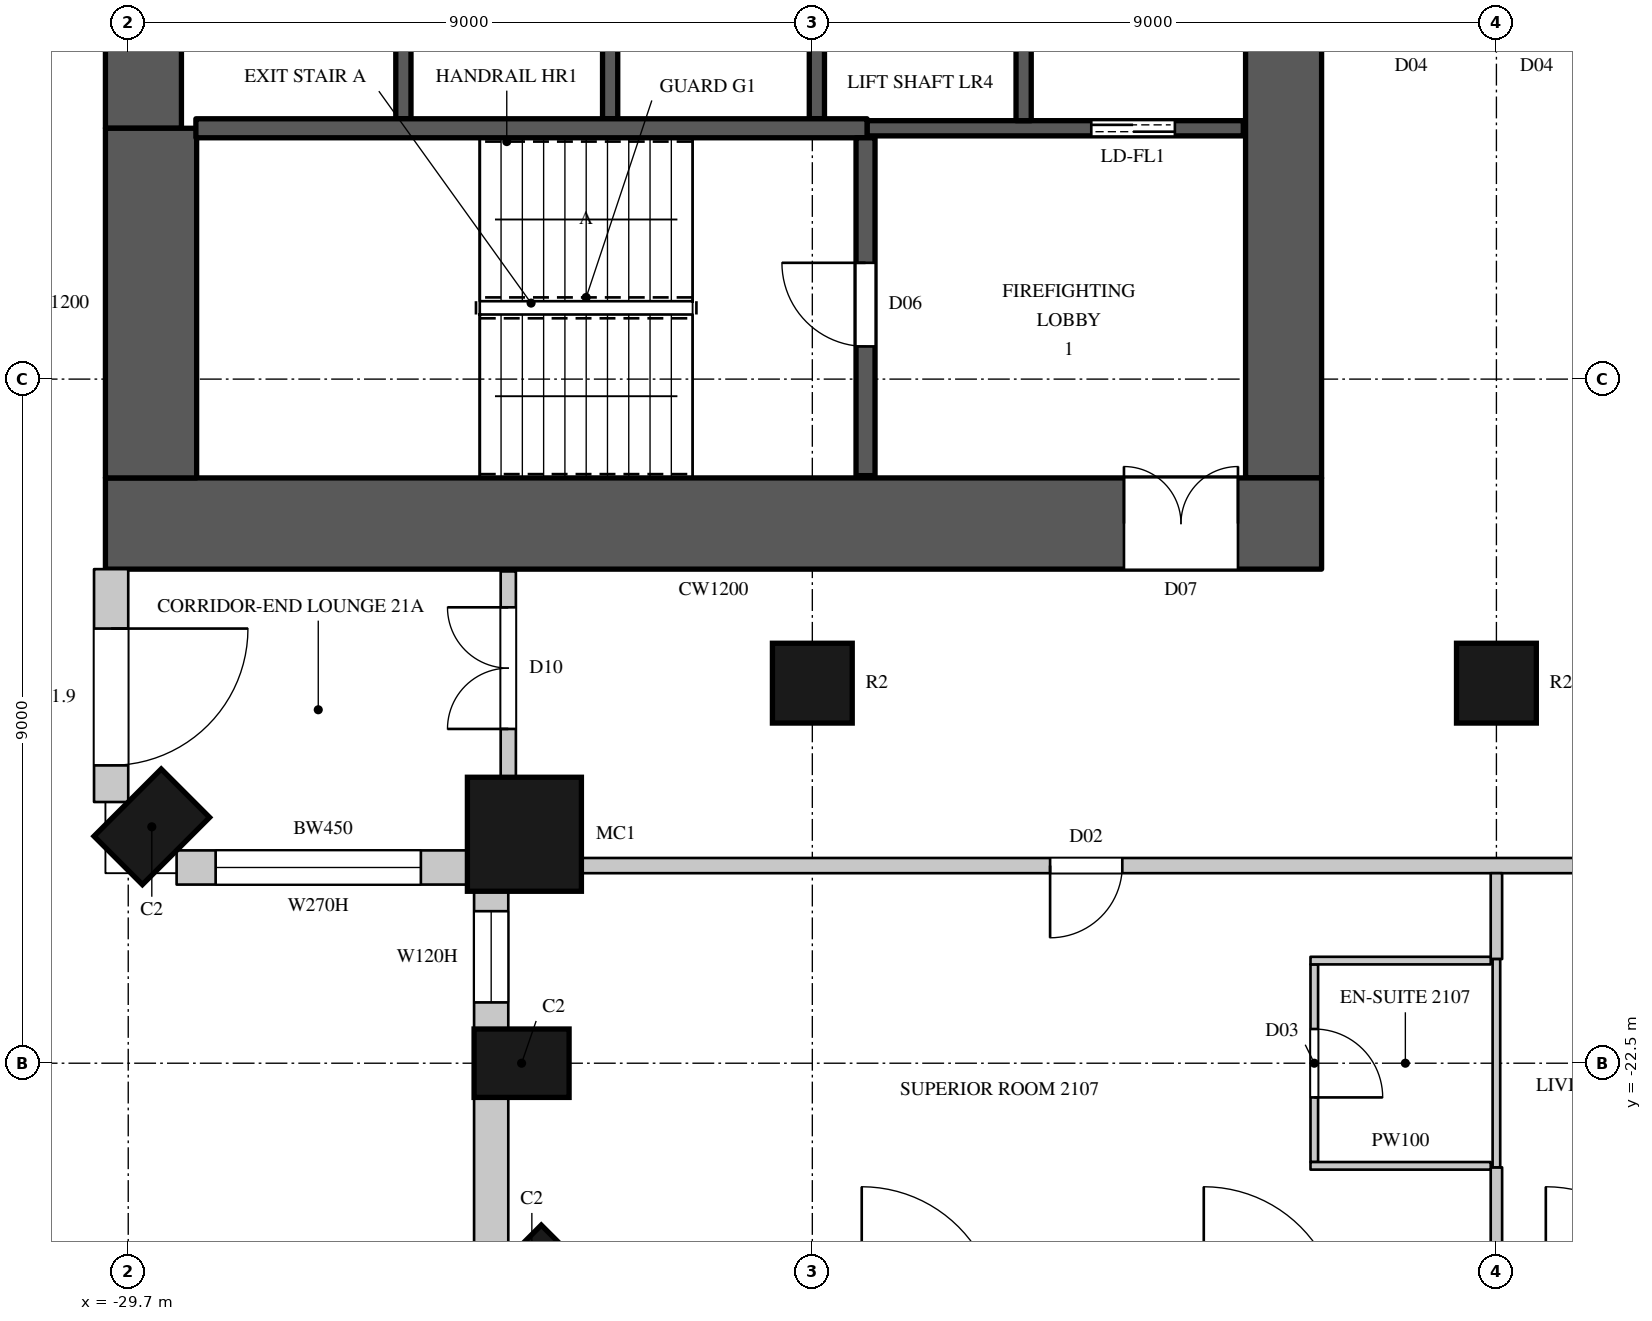
"""IFC4 building model, lengths in metres.
Left out: names, types, materials, properties, quantities, classifications, styles, units other than length and angle.
Written with IfcOpenShell. Run it as: python <this file> out.ifc"""

import sys

from ifc_helpers import new_model, si_unit, direction, frame, frame_2d, origin, origin_2d, place, context, subcontext, project, spatial, rectangle, circle, extrude, element, fill, save


model = new_model("IFC4")
c1 = context("Model", 3, precision=1e-05, world=origin(), true_north=direction((0.0, 1.0)))
c2 = subcontext(c1, "Body", "Model", "MODEL_VIEW")
j1 = project(units=[si_unit("LENGTHUNIT", "METRE"), si_unit("PLANEANGLEUNIT", "RADIAN")], contexts=[c1])
p1 = place(None, origin())
s1 = spatial("IfcSite", under=j1, at=p1, CompositionType="ELEMENT")
p2 = place(p1, origin())
s2 = spatial("IfcBuilding", under=s1, at=p2, CompositionType="ELEMENT")
p3 = place(p2, frame((0.0, 0.0, 105.9)))
s3 = spatial("IfcBuildingStorey", under=s2, at=p3, CompositionType="ELEMENT", Elevation=105.9)
p4 = place(p3, frame((-29.39, -19.39, 0.0), z_axis=(0.0, 0.0, 1.0), x_axis=(0.707106781187, -0.707106781187, 0.0)))
e1 = element("IfcColumn", 1, at=p4, inside=s3, PredefinedType="COLUMN", context=c2, shape_type="SweptSolid", body=[
    extrude(rectangle(XDim=0.9, YDim=1.25, at=origin_2d()), origin(), (0.0, 0.0, 1.0), 3.6),
])
p5 = place(p3, frame((-24.488, -19.488, 0.0), z_axis=(0.0, 0.0, 1.0), x_axis=(1.0, 0.0, 0.0)))
e2 = element("IfcColumn", 2, at=p5, inside=s3, PredefinedType="COLUMN", context=c2, shape_type="SweptSolid", body=[
    extrude(circle(Radius=0.75, at=origin_2d()), origin(), (0.0, 0.0, 1.0), 3.6),
])
for number, where, z_axis, x_axis in (
    (3, (-24.525, -22.5, 0.0), (0.0, 0.0, 1.0), (0.0, -1.0, 0.0)),
    (4, (-24.39, -25.39, 0.0), (0.0, 0.0, 1.0), (0.707, -0.707, 0.0)),
):
    element("IfcColumn", number, at=place(p3, frame(where, z_axis=z_axis, x_axis=x_axis)), inside=s3, PredefinedType="COLUMN", context=c2, shape_type="SweptSolid", body=[
        extrude(rectangle(XDim=0.9, YDim=1.25, at=origin_2d()), origin(), (0.0, 0.0, 1.0), 3.6),
    ])
for number, where, z_axis, x_axis in (
    (5, (-20.7, -17.5, 0.0), (0.0, 0.0, 1.0), (1.0, 0.0, 0.0)),
    (6, (-11.7, -17.5, 0.0), (0.0, 0.0, 1.0), (1.0, 0.0, 0.0)),
):
    element("IfcColumn", number, at=place(p3, frame(where, z_axis=z_axis, x_axis=x_axis)), inside=s3, PredefinedType="COLUMN", context=c2, shape_type="SweptSolid", body=[
        extrude(circle(Radius=0.525, at=origin_2d()), origin(), (0.0, 0.0, 1.0), 3.6),
    ])
p6 = place(p3, frame((-29.925, -16.0, 0.0), z_axis=(0.0, 0.0, 1.0), x_axis=(0.0, -1.0, 0.0)))
e7 = element("IfcWall", 7, at=p6, inside=s3, PredefinedType="SOLIDWALL", context=c2, shape_type="SweptSolid", body=[
    extrude(rectangle(XDim=3.064, YDim=0.45, at=frame_2d((1.532, 0.0))), origin(), (0.0, 0.0, 1.0), 3.3),
])
p7 = place(p6, frame((0.782, 0.0, 0.0)))
e8 = element("IfcOpeningElement", 8, at=p7, cuts=e7, PredefinedType="OPENING", context=c2, shape_type="SweptSolid", body=[
    extrude(rectangle(XDim=1.8, YDim=2.4, at=frame_2d((0.9, 1.2))), frame((0.0, 0.235, 0.0), z_axis=(0.0, -1.0, 0.0), x_axis=(1.0, 0.0, 0.0)), (0.0, 0.0, 1.0), 0.47),
])
p8 = place(p3, frame((-29.064, -19.925, 0.0), z_axis=(0.0, 0.0, 1.0), x_axis=(1.0, 0.0, 0.0)))
e9 = element("IfcWall", 9, at=p8, inside=s3, PredefinedType="SOLIDWALL", context=c2, shape_type="SweptSolid", body=[
    extrude(rectangle(XDim=3.857, YDim=0.45, at=frame_2d((1.928, 0.0))), origin(), (0.0, 0.0, 1.0), 3.3),
])
p9 = place(p8, frame((0.514, 0.0, 1.05)))
e10 = element("IfcOpeningElement", 10, at=p9, cuts=e9, PredefinedType="OPENING", context=c2, shape_type="SweptSolid", body=[
    extrude(rectangle(XDim=2.7, YDim=2.0, at=frame_2d((1.35, 1.0))), frame((0.0, 0.235, 0.0), z_axis=(0.0, -1.0, 0.0), x_axis=(1.0, 0.0, 0.0)), (0.0, 0.0, 1.0), 0.47),
])
p10 = place(p3, frame((-24.925, -20.207, 0.0), z_axis=(0.0, 0.0, 1.0), x_axis=(0.0, -1.0, 0.0)))
e11 = element("IfcWall", 11, at=p10, inside=s3, PredefinedType="SOLIDWALL", context=c2, shape_type="SweptSolid", body=[
    extrude(rectangle(XDim=1.843, YDim=0.45, at=frame_2d((0.921, 0.0))), origin(), (0.0, 0.0, 1.0), 3.3),
])
p11 = place(p10, frame((0.293, 0.0, 1.05)))
e12 = element("IfcOpeningElement", 12, at=p11, cuts=e11, PredefinedType="OPENING", context=c2, shape_type="SweptSolid", body=[
    extrude(rectangle(XDim=1.2, YDim=2.0, at=frame_2d((0.6, 1.0))), frame((0.0, 0.235, 0.0), z_axis=(0.0, -1.0, 0.0), x_axis=(1.0, 0.0, 0.0)), (0.0, 0.0, 1.0), 0.47),
])
p12 = place(p3, frame((-24.925, -22.95, 0.0), z_axis=(0.0, 0.0, 1.0), x_axis=(0.0, -1.0, 0.0)))
e13 = element("IfcWall", 13, at=p12, inside=s3, PredefinedType="SOLIDWALL", context=c2, shape_type="SweptSolid", body=[
    extrude(rectangle(XDim=2.114, YDim=0.45, at=frame_2d((1.057, 0.0))), origin(), (0.0, 0.0, 1.0), 3.3),
])
p13 = place(p3, frame((-30.0, -15.4, 0.0), z_axis=(0.0, 0.0, 1.0), x_axis=(1.0, 0.0, 0.0)))
e14 = element("IfcWall", 14, at=p13, inside=s3, PredefinedType="SHEAR", context=c2, shape_type="SweptSolid", body=[
    extrude(rectangle(XDim=16.0, YDim=1.2, at=frame_2d((8.0, 0.0))), origin(), (0.0, 0.0, 1.0), 3.6),
])
p14 = place(p13, frame((13.4, 0.0, 0.0)))
e15 = element("IfcOpeningElement", 15, at=p14, cuts=e14, PredefinedType="OPENING", context=c2, shape_type="SweptSolid", body=[
    extrude(rectangle(XDim=1.5, YDim=2.4, at=frame_2d((0.75, 1.2))), frame((0.0, 0.61, 0.0), z_axis=(0.0, -1.0, 0.0), x_axis=(1.0, 0.0, 0.0)), (0.0, 0.0, 1.0), 1.22),
])
p15 = place(p3, frame((-14.5, -14.8, 0.0), z_axis=(0.0, 0.0, 1.0), x_axis=(0.0, 1.0, 0.0)))
e16 = element("IfcWall", 16, at=p15, inside=s3, PredefinedType="SHEAR", context=c2, shape_type="SweptSolid", body=[
    extrude(rectangle(XDim=29.6, YDim=1.0, at=frame_2d((14.8, 0.0))), origin(), (0.0, 0.0, 1.0), 3.6),
])
p16 = place(p15, frame((8.45, 0.0, 0.0)))
e17 = element("IfcOpeningElement", 17, at=p16, cuts=e16, PredefinedType="OPENING", context=c2, shape_type="SweptSolid", body=[
    extrude(rectangle(XDim=1.5, YDim=2.4, at=frame_2d((0.75, 1.2))), frame((0.0, 0.51, 0.0), z_axis=(0.0, -1.0, 0.0), x_axis=(1.0, 0.0, 0.0)), (0.0, 0.0, 1.0), 1.02),
])
p17 = place(p15, frame((19.65, 0.0, 0.0)))
e18 = element("IfcOpeningElement", 18, at=p17, cuts=e16, PredefinedType="OPENING", context=c2, shape_type="SweptSolid", body=[
    extrude(rectangle(XDim=1.5, YDim=2.4, at=frame_2d((0.75, 1.2))), frame((0.0, 0.51, 0.0), z_axis=(0.0, -1.0, 0.0), x_axis=(1.0, 0.0, 0.0)), (0.0, 0.0, 1.0), 1.02),
])
p18 = place(p15, frame((14.5, 0.0, 0.0)))
e19 = element("IfcOpeningElement", 19, at=p18, cuts=e16, PredefinedType="OPENING", context=c2, shape_type="SweptSolid", body=[
    extrude(rectangle(XDim=0.6, YDim=2.0, at=frame_2d((0.3, 1.0))), frame((0.0, 0.51, 0.0), z_axis=(0.0, -1.0, 0.0), x_axis=(1.0, 0.0, 0.0)), (0.0, 0.0, 1.0), 1.02),
])
p19 = place(p3, frame((-29.5, -10.2, 0.0), z_axis=(0.0, 0.0, 1.0), x_axis=(0.0, 1.0, 0.0)))
e20 = element("IfcWall", 20, at=p19, inside=s3, PredefinedType="SHEAR", context=c2, shape_type="SweptSolid", body=[
    extrude(rectangle(XDim=20.4, YDim=1.0, at=frame_2d((10.2, 0.0))), origin(), (0.0, 0.0, 1.0), 3.6),
])
p20 = place(p3, frame((-29.4, -14.8, 0.0), z_axis=(0.0, 0.0, 1.0), x_axis=(0.0, 1.0, 0.0)))
e21 = element("IfcWall", 21, at=p20, inside=s3, PredefinedType="SHEAR", context=c2, shape_type="SweptSolid", body=[
    extrude(rectangle(XDim=4.6, YDim=1.2, at=frame_2d((2.3, 0.0))), origin(), (0.0, 0.0, 1.0), 3.6),
])
p21 = place(p3, frame((-24.7, -18.752, 0.0), z_axis=(0.0, 0.0, 1.0), x_axis=(0.0, 1.0, 0.0)))
e22 = element("IfcWall", 22, at=p21, inside=s3, PredefinedType="PARTITIONING", context=c2, shape_type="SweptSolid", body=[
    extrude(rectangle(XDim=2.722, YDim=0.2, at=frame_2d((1.361, 0.0))), origin(), (0.0, 0.0, 1.0), 3.3),
])
p22 = place(p21, frame((0.65, 0.0, 0.0)))
e23 = element("IfcOpeningElement", 23, at=p22, cuts=e22, PredefinedType="OPENING", context=c2, shape_type="SweptSolid", body=[
    extrude(rectangle(XDim=1.6, YDim=2.4, at=frame_2d((0.8, 1.2))), frame((0.0, 0.11, 0.0), z_axis=(0.0, -1.0, 0.0), x_axis=(1.0, 0.0, 0.0)), (0.0, 0.0, 1.0), 0.22),
])
p23 = place(p3, frame((-23.822, -19.9, 0.0), z_axis=(0.0, 0.0, 1.0), x_axis=(1.0, 0.0, 0.0)))
e24 = element("IfcWall", 24, at=p23, inside=s3, PredefinedType="PARTITIONING", context=c2, shape_type="SweptSolid", body=[
    extrude(rectangle(XDim=42.222, YDim=0.2, at=frame_2d((21.111, 0.0))), origin(), (0.0, 0.0, 1.0), 3.3),
])
p24 = place(p23, frame((6.25, 0.0, 0.0)))
e25 = element("IfcOpeningElement", 25, at=p24, cuts=e24, PredefinedType="OPENING", context=c2, shape_type="SweptSolid", body=[
    extrude(rectangle(XDim=0.95, YDim=2.2, at=frame_2d((0.475, 1.1))), frame((0.0, 0.11, 0.0), z_axis=(0.0, -1.0, 0.0), x_axis=(1.0, 0.0, 0.0)), (0.0, 0.0, 1.0), 0.22),
])
p25 = place(p23, frame((14.15, 0.0, 0.0)))
e26 = element("IfcOpeningElement", 26, at=p25, cuts=e24, PredefinedType="OPENING", context=c2, shape_type="SweptSolid", body=[
    extrude(rectangle(XDim=1.1, YDim=2.4, at=frame_2d((0.55, 1.2))), frame((0.0, 0.11, 0.0), z_axis=(0.0, -1.0, 0.0), x_axis=(1.0, 0.0, 0.0)), (0.0, 0.0, 1.0), 0.22),
])
p26 = place(p23, frame((24.25, 0.0, 0.0)))
e27 = element("IfcOpeningElement", 27, at=p26, cuts=e24, PredefinedType="OPENING", context=c2, shape_type="SweptSolid", body=[
    extrude(rectangle(XDim=0.95, YDim=2.2, at=frame_2d((0.475, 1.1))), frame((0.0, 0.11, 0.0), z_axis=(0.0, -1.0, 0.0), x_axis=(1.0, 0.0, 0.0)), (0.0, 0.0, 1.0), 0.22),
])
p27 = place(p23, frame((32.95, 0.0, 0.0)))
e28 = element("IfcOpeningElement", 28, at=p27, cuts=e24, PredefinedType="OPENING", context=c2, shape_type="SweptSolid", body=[
    extrude(rectangle(XDim=1.1, YDim=2.4, at=frame_2d((0.55, 1.2))), frame((0.0, 0.11, 0.0), z_axis=(0.0, -1.0, 0.0), x_axis=(1.0, 0.0, 0.0)), (0.0, 0.0, 1.0), 0.22),
])
p28 = place(p3, frame((-11.7, -24.9, 0.0), z_axis=(0.0, 0.0, 1.0), x_axis=(0.0, 1.0, 0.0)))
e29 = element("IfcWall", 29, at=p28, inside=s3, PredefinedType="PARTITIONING", context=c2, shape_type="SweptSolid", body=[
    extrude(rectangle(XDim=1.03, YDim=0.15, at=frame_2d((0.515, 0.0))), origin(), (0.0, 0.0, 1.0), 2.75),
])
p29 = place(p3, frame((-11.7, -21.13, 0.0), z_axis=(0.0, 0.0, 1.0), x_axis=(0.0, 1.0, 0.0)))
e30 = element("IfcWall", 30, at=p29, inside=s3, PredefinedType="PARTITIONING", context=c2, shape_type="SweptSolid", body=[
    extrude(rectangle(XDim=1.13, YDim=0.15, at=frame_2d((0.565, 0.0))), origin(), (0.0, 0.0, 1.0), 2.75),
])
for number, where, z_axis, x_axis in (
    (31, (-26.08, -10.075, 0.0), (0.0, 0.0, 1.0), (0.0, 1.0, 0.0)),
    (32, (-23.36, -10.075, 0.0), (0.0, 0.0, 1.0), (0.0, 1.0, 0.0)),
    (33, (-20.64, -10.075, 0.0), (0.0, 0.0, 1.0), (0.0, 1.0, 0.0)),
):
    element("IfcWall", number, at=place(p3, frame(where, z_axis=z_axis, x_axis=x_axis)), inside=s3, PredefinedType="SHEAR", context=c2, shape_type="SweptSolid", body=[
        extrude(rectangle(XDim=2.575, YDim=0.2, at=frame_2d((1.288, 0.0))), origin(), (0.0, 0.0, 1.0), 3.6),
    ])
p30 = place(p3, frame((-19.98, -10.2, 0.0), z_axis=(0.0, 0.0, 1.0), x_axis=(1.0, 0.0, 0.0)))
e34 = element("IfcWall", 34, at=p30, inside=s3, PredefinedType="SHEAR", context=c2, shape_type="SweptSolid", body=[
    extrude(rectangle(XDim=4.95, YDim=0.2, at=frame_2d((2.475, 0.0))), origin(), (0.0, 0.0, 1.0), 3.3),
])
p31 = place(p30, frame((2.95, 0.0, 0.0)))
e35 = element("IfcOpeningElement", 35, at=p31, cuts=e34, PredefinedType="OPENING", context=c2, shape_type="SweptSolid", body=[
    extrude(rectangle(XDim=1.1, YDim=2.2, at=frame_2d((0.55, 1.1))), frame((0.0, 0.11, 0.0), z_axis=(0.0, -1.0, 0.0), x_axis=(1.0, 0.0, 0.0)), (0.0, 0.0, 1.0), 0.22),
])
p32 = place(p3, frame((-17.92, -10.1, 0.0), z_axis=(0.0, 0.0, 1.0), x_axis=(0.0, 1.0, 0.0)))
e36 = element("IfcWall", 36, at=p32, inside=s3, PredefinedType="SHEAR", context=c2, shape_type="SweptSolid", body=[
    extrude(rectangle(XDim=2.6, YDim=0.2, at=frame_2d((1.3, 0.0))), origin(), (0.0, 0.0, 1.0), 3.6),
])
p33 = place(p3, frame((-28.81, -10.2, 0.0), z_axis=(0.0, 0.0, 1.0), x_axis=(1.0, 0.0, 0.0)))
e37 = element("IfcWall", 37, at=p33, inside=s3, PredefinedType="SHEAR", context=c2, shape_type="SweptSolid", body=[
    extrude(rectangle(XDim=8.83, YDim=0.25, at=frame_2d((4.415, 0.0))), origin(), (0.0, 0.0, 1.0), 3.3),
])
p34 = place(p3, frame((-20.0, -14.77, 0.0), z_axis=(0.0, 0.0, 1.0), x_axis=(0.0, 1.0, 0.0)))
e38 = element("IfcWall", 38, at=p34, inside=s3, PredefinedType="SHEAR", context=c2, shape_type="SweptSolid", body=[
    extrude(rectangle(XDim=4.445, YDim=0.25, at=frame_2d((2.223, 0.0))), origin(), (0.0, 0.0, 1.0), 3.3),
])
p35 = place(p34, frame((1.7, 0.0, 0.0)))
e39 = element("IfcOpeningElement", 39, at=p35, cuts=e38, PredefinedType="OPENING", context=c2, shape_type="SweptSolid", body=[
    extrude(rectangle(XDim=1.1, YDim=2.2, at=frame_2d((0.55, 1.1))), frame((0.0, 0.135, 0.0), z_axis=(0.0, -1.0, 0.0), x_axis=(1.0, 0.0, 0.0)), (0.0, 0.0, 1.0), 0.27),
])
p36 = place(p3, frame((-14.096, -23.8, 0.0), z_axis=(0.0, 0.0, 1.0), x_axis=(0.0, 1.0, 0.0)))
e40 = element("IfcWall", 40, at=p36, inside=s3, PredefinedType="PARTITIONING", context=c2, shape_type="SweptSolid", body=[
    extrude(rectangle(XDim=2.6, YDim=0.1, at=frame_2d((1.3, 0.0))), origin(), (0.0, 0.0, 1.0), 3.3),
])
p37 = place(p36, frame((0.85, 0.0, 0.0)))
e41 = element("IfcOpeningElement", 41, at=p37, cuts=e40, PredefinedType="OPENING", context=c2, shape_type="SweptSolid", body=[
    extrude(rectangle(XDim=0.9, YDim=2.2, at=frame_2d((0.45, 1.1))), frame((0.0, 0.06, 0.0), z_axis=(0.0, -1.0, 0.0), x_axis=(1.0, 0.0, 0.0)), (0.0, 0.0, 1.0), 0.12),
])
for number, where, z_axis, x_axis in (
    (42, (-14.146, -23.85, 0.0), (0.0, 0.0, 1.0), (1.0, 0.0, 0.0)),
    (43, (-14.146, -21.15, 0.0), (0.0, 0.0, 1.0), (1.0, 0.0, 0.0)),
):
    element("IfcWall", number, at=place(p3, frame(where, z_axis=z_axis, x_axis=x_axis)), inside=s3, PredefinedType="PARTITIONING", context=c2, shape_type="SweptSolid", body=[
        extrude(rectangle(XDim=2.371, YDim=0.1, at=frame_2d((1.186, 0.0))), origin(), (0.0, 0.0, 1.0), 3.3),
    ])
p38 = place(p3, frame((-11.7, -23.87, 0.0), z_axis=(0.0, 0.0, 1.0), x_axis=(0.0, 1.0, 0.0)))
e44 = element("IfcWall", 44, at=p38, inside=s3, PredefinedType="PARTITIONING", context=c2, shape_type="SweptSolid", body=[
    extrude(rectangle(XDim=2.74, YDim=0.1, at=frame_2d((1.37, 0.0))), origin(), (0.0, 0.0, 1.0), 2.75),
])
p39 = place(p7, origin())
e45 = element("IfcDoor", 45, at=p39, inside=s3, OperationType="SLIDING_TO_LEFT", PredefinedType="DOOR", context=c2, shape_type="SweptSolid", body=[
    extrude(rectangle(XDim=1.8, YDim=2.4, at=frame_2d((0.9, 1.2))), frame((0.0, 0.13, 0.0), z_axis=(0.0, -1.0, 0.0), x_axis=(1.0, 0.0, 0.0)), (0.0, 0.0, 1.0), 0.05),
])
fill(e8, e45)
p40 = place(p9, origin())
e46 = element("IfcWindow", 46, at=p40, inside=s3, PartitioningType="SINGLE_PANEL", PredefinedType="WINDOW", context=c2, shape_type="SweptSolid", body=[
    extrude(rectangle(XDim=2.7, YDim=2.0, at=frame_2d((1.35, 1.0))), frame((0.0, 0.135, 0.0), z_axis=(0.0, -1.0, 0.0), x_axis=(1.0, 0.0, 0.0)), (0.0, 0.0, 1.0), 0.06),
])
fill(e10, e46)
p41 = place(p11, origin())
e47 = element("IfcWindow", 47, at=p41, inside=s3, PartitioningType="SINGLE_PANEL", PredefinedType="WINDOW", context=c2, shape_type="SweptSolid", body=[
    extrude(rectangle(XDim=1.2, YDim=2.0, at=frame_2d((0.6, 1.0))), frame((0.0, 0.135, 0.0), z_axis=(0.0, -1.0, 0.0), x_axis=(1.0, 0.0, 0.0)), (0.0, 0.0, 1.0), 0.06),
])
fill(e12, e47)
p42 = place(p35, origin())
e48 = element("IfcDoor", 48, at=p42, inside=s3, OperationType="SINGLE_SWING_RIGHT", PredefinedType="DOOR", context=c2, shape_type="SweptSolid", body=[
    extrude(rectangle(XDim=1.1, YDim=2.2, at=frame_2d((0.55, 1.1))), frame((0.0, 0.025, 0.0), z_axis=(0.0, -1.0, 0.0), x_axis=(1.0, 0.0, 0.0)), (0.0, 0.0, 1.0), 0.05),
])
fill(e39, e48)
p43 = place(p31, origin())
e49 = element("IfcDoor", 49, at=p43, inside=s3, OperationType="DOUBLE_DOOR_SLIDING", PredefinedType="DOOR", context=c2, shape_type="SweptSolid", body=[
    extrude(rectangle(XDim=1.1, YDim=2.2, at=frame_2d((0.55, 1.1))), frame((0.0, 0.025, 0.0), z_axis=(0.0, -1.0, 0.0), x_axis=(1.0, 0.0, 0.0)), (0.0, 0.0, 1.0), 0.05),
])
fill(e35, e49)
p44 = place(p22, origin())
e50 = element("IfcDoor", 50, at=p44, inside=s3, OperationType="DOUBLE_DOOR_SINGLE_SWING", PredefinedType="DOOR", context=c2, shape_type="SweptSolid", body=[
    extrude(rectangle(XDim=1.6, YDim=2.4, at=frame_2d((0.8, 1.2))), frame((0.0, 0.025, 0.0), z_axis=(0.0, -1.0, 0.0), x_axis=(1.0, 0.0, 0.0)), (0.0, 0.0, 1.0), 0.05),
])
fill(e23, e50)
p45 = place(p24, origin())
e51 = element("IfcDoor", 51, at=p45, inside=s3, OperationType="SINGLE_SWING_RIGHT", PredefinedType="DOOR", context=c2, shape_type="SweptSolid", body=[
    extrude(rectangle(XDim=0.95, YDim=2.2, at=frame_2d((0.475, 1.1))), frame((0.0, 0.025, 0.0), z_axis=(0.0, -1.0, 0.0), x_axis=(1.0, 0.0, 0.0)), (0.0, 0.0, 1.0), 0.05),
])
fill(e25, e51)
p46 = place(p37, origin())
e52 = element("IfcDoor", 52, at=p46, inside=s3, OperationType="SINGLE_SWING_RIGHT", PredefinedType="DOOR", context=c2, shape_type="SweptSolid", body=[
    extrude(rectangle(XDim=0.9, YDim=2.2, at=frame_2d((0.45, 1.1))), frame((0.0, 0.025, 0.0), z_axis=(0.0, -1.0, 0.0), x_axis=(1.0, 0.0, 0.0)), (0.0, 0.0, 1.0), 0.05),
])
fill(e41, e52)
p47 = place(p14, origin())
e53 = element("IfcDoor", 53, at=p47, inside=s3, OperationType="DOUBLE_DOOR_SINGLE_SWING", PredefinedType="DOOR", context=c2, shape_type="SweptSolid", body=[
    extrude(rectangle(XDim=1.5, YDim=2.4, at=frame_2d((0.75, 1.2))), frame((0.0, 0.025, 0.0), z_axis=(0.0, -1.0, 0.0), x_axis=(1.0, 0.0, 0.0)), (0.0, 0.0, 1.0), 0.05),
])
fill(e15, e53)
save(model, sys.argv[1])
